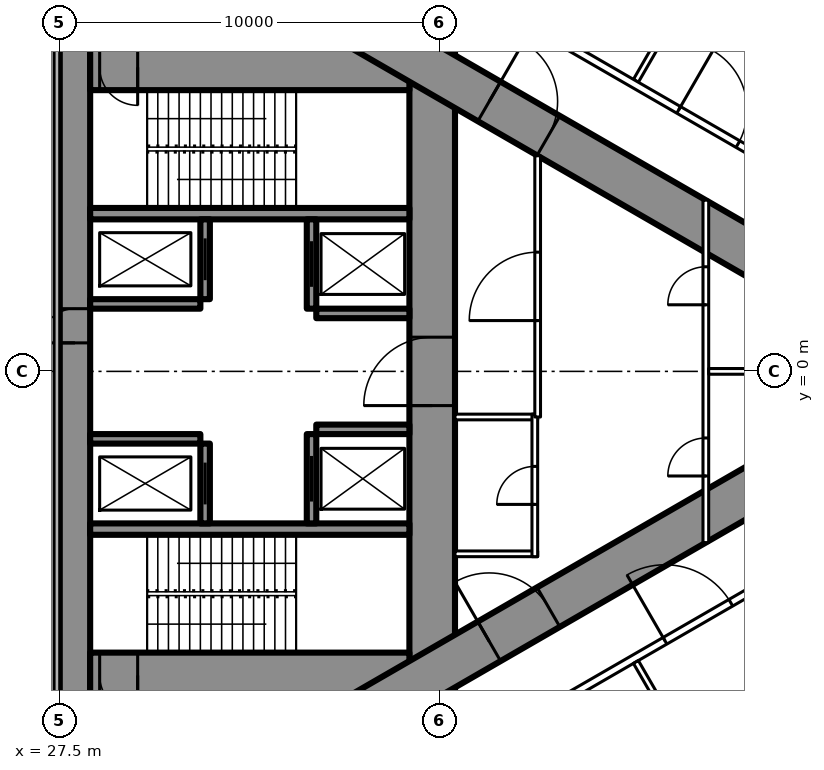
"""IFC4 building model, lengths in metres.
Left out: names, types, materials, properties, quantities, classifications, styles, units other than length and angle.
Written with IfcOpenShell. Run it as: python <this file> out.ifc"""

import sys

from ifc_helpers import new_model, si_unit, direction, frame, frame_2d, origin, place, context, subcontext, project, spatial, rectangle, extrude, element, fill, save


model = new_model("IFC4")
c1 = context("Model", 3, precision=1e-05, world=origin(), true_north=direction((0.0, 1.0)))
c2 = subcontext(c1, "Body", "Model", "MODEL_VIEW")
j1 = project(units=[si_unit("LENGTHUNIT", "METRE"), si_unit("PLANEANGLEUNIT", "RADIAN")], contexts=[c1])
p1 = place(None, origin())
s1 = spatial("IfcSite", under=j1, at=p1, CompositionType="ELEMENT")
p2 = place(p1, origin())
s2 = spatial("IfcBuilding", under=s1, at=p2, CompositionType="ELEMENT")
p3 = place(p2, frame((0.0, 0.0, 251.9)))
s3 = spatial("IfcBuildingStorey", under=s2, at=p3, CompositionType="ELEMENT", Elevation=251.9)
p4 = place(p3, frame((27.9, -8.6, 0.0), z_axis=(0.0, 0.0, 1.0), x_axis=(0.0, 1.0, 0.0)))
e1 = element("IfcWall", 1, at=p4, inside=s3, PredefinedType="SHEAR", context=c2, shape_type="SweptSolid", body=[
    extrude(rectangle(XDim=17.2, YDim=0.8, at=frame_2d((8.6, 0.0))), origin(), (0.0, 0.0, 1.0), 5.4),
])
p5 = place(p4, frame((9.35, 0.0, 0.0)))
e2 = element("IfcOpeningElement", 2, at=p5, cuts=e1, PredefinedType="OPENING", context=c2, shape_type="SweptSolid", body=[
    extrude(rectangle(XDim=0.9, YDim=2.2, at=frame_2d((0.45, 1.1))), frame((0.0, 0.41, 0.0), z_axis=(0.0, -1.0, 0.0), x_axis=(1.0, 0.0, 0.0)), (0.0, 0.0, 1.0), 0.82),
])
p6 = place(p3, frame((37.3, -8.6, 0.0), z_axis=(0.0, 0.0, 1.0), x_axis=(0.0, 1.0, 0.0)))
e3 = element("IfcWall", 3, at=p6, inside=s3, PredefinedType="SHEAR", context=c2, shape_type="SweptSolid", body=[
    extrude(rectangle(XDim=17.2, YDim=1.2, at=frame_2d((8.6, 0.0))), origin(), (0.0, 0.0, 1.0), 5.4),
])
p7 = place(p6, frame((7.7, 0.0, 0.0)))
e4 = element("IfcOpeningElement", 4, at=p7, cuts=e3, PredefinedType="OPENING", context=c2, shape_type="SweptSolid", body=[
    extrude(rectangle(XDim=1.8, YDim=2.2, at=frame_2d((0.9, 1.1))), frame((0.0, 0.61, 0.0), z_axis=(0.0, -1.0, 0.0), x_axis=(1.0, 0.0, 0.0)), (0.0, 0.0, 1.0), 1.22),
])
p8 = place(p3, frame((28.3, -8.0, 0.0), z_axis=(0.0, 0.0, 1.0), x_axis=(1.0, 0.0, 0.0)))
e5 = element("IfcWall", 5, at=p8, inside=s3, PredefinedType="SHEAR", context=c2, shape_type="SweptSolid", body=[
    extrude(rectangle(XDim=8.4, YDim=1.2, at=frame_2d((4.2, 0.0))), origin(), (0.0, 0.0, 1.0), 5.4),
])
p9 = place(p8, frame((0.25, 0.0, 0.0)))
e6 = element("IfcOpeningElement", 6, at=p9, cuts=e5, PredefinedType="OPENING", context=c2, shape_type="SweptSolid", body=[
    extrude(rectangle(XDim=1.0, YDim=2.2, at=frame_2d((0.5, 1.1))), frame((0.0, 0.61, 0.0), z_axis=(0.0, -1.0, 0.0), x_axis=(1.0, 0.0, 0.0)), (0.0, 0.0, 1.0), 1.22),
])
p10 = place(p3, frame((28.3, 8.0, 0.0), z_axis=(0.0, 0.0, 1.0), x_axis=(1.0, 0.0, 0.0)))
e7 = element("IfcWall", 7, at=p10, inside=s3, PredefinedType="SHEAR", context=c2, shape_type="SweptSolid", body=[
    extrude(rectangle(XDim=8.4, YDim=1.2, at=frame_2d((4.2, 0.0))), origin(), (0.0, 0.0, 1.0), 5.4),
])
p11 = place(p10, frame((0.25, 0.0, 0.0)))
e8 = element("IfcOpeningElement", 8, at=p11, cuts=e7, PredefinedType="OPENING", context=c2, shape_type="SweptSolid", body=[
    extrude(rectangle(XDim=1.0, YDim=2.2, at=frame_2d((0.5, 1.1))), frame((0.0, 0.61, 0.0), z_axis=(0.0, -1.0, 0.0), x_axis=(1.0, 0.0, 0.0)), (0.0, 0.0, 1.0), 1.22),
])
for number, where, z_axis, x_axis in (
    (9, (28.3, -4.15, 0.0), (0.0, 0.0, 1.0), (1.0, 0.0, 0.0)),
    (10, (28.3, 4.15, 0.0), (0.0, 0.0, 1.0), (1.0, 0.0, 0.0)),
):
    element("IfcWall", number, at=place(p3, frame(where, z_axis=z_axis, x_axis=x_axis)), inside=s3, PredefinedType="SHEAR", context=c2, shape_type="SweptSolid", body=[
        extrude(rectangle(XDim=8.4, YDim=0.3, at=frame_2d((4.2, 0.0))), origin(), (0.0, 0.0, 1.0), 5.4),
    ])
p12 = place(p3, frame((31.325, -4.0, 0.0), z_axis=(0.0, 0.0, 1.0), x_axis=(0.0, 1.0, 0.0)))
e11 = element("IfcWall", 11, at=p12, inside=s3, PredefinedType="SHEAR", context=c2, shape_type="SweptSolid", body=[
    extrude(rectangle(XDim=2.1, YDim=0.25, at=frame_2d((1.05, 0.0))), origin(), (0.0, 0.0, 1.0), 5.4),
])
p13 = place(p12, frame((0.5, 0.0, 0.0)))
e12 = element("IfcOpeningElement", 12, at=p13, cuts=e11, PredefinedType="OPENING", context=c2, shape_type="SweptSolid", body=[
    extrude(rectangle(XDim=1.1, YDim=2.2, at=frame_2d((0.55, 1.1))), frame((0.0, 0.135, 0.0), z_axis=(0.0, -1.0, 0.0), x_axis=(1.0, 0.0, 0.0)), (0.0, 0.0, 1.0), 0.27),
])
p14 = place(p3, frame((34.125, -4.0, 0.0), z_axis=(0.0, 0.0, 1.0), x_axis=(0.0, 1.0, 0.0)))
e13 = element("IfcWall", 13, at=p14, inside=s3, PredefinedType="SHEAR", context=c2, shape_type="SweptSolid", body=[
    extrude(rectangle(XDim=2.35, YDim=0.25, at=frame_2d((1.175, 0.0))), origin(), (0.0, 0.0, 1.0), 5.4),
])
p15 = place(p14, frame((0.575, 0.0, 0.0)))
e14 = element("IfcOpeningElement", 14, at=p15, cuts=e13, PredefinedType="OPENING", context=c2, shape_type="SweptSolid", body=[
    extrude(rectangle(XDim=1.2, YDim=2.2, at=frame_2d((0.6, 1.1))), frame((0.0, 0.135, 0.0), z_axis=(0.0, -1.0, 0.0), x_axis=(1.0, 0.0, 0.0)), (0.0, 0.0, 1.0), 0.27),
])
p16 = place(p3, frame((28.3, -1.775, 0.0), z_axis=(0.0, 0.0, 1.0), x_axis=(1.0, 0.0, 0.0)))
e15 = element("IfcWall", 15, at=p16, inside=s3, PredefinedType="SHEAR", context=c2, shape_type="SweptSolid", body=[
    extrude(rectangle(XDim=2.9, YDim=0.25, at=frame_2d((1.45, 0.0))), origin(), (0.0, 0.0, 1.0), 5.4),
])
p17 = place(p3, frame((34.25, -1.525, 0.0), z_axis=(0.0, 0.0, 1.0), x_axis=(1.0, 0.0, 0.0)))
e16 = element("IfcWall", 16, at=p17, inside=s3, PredefinedType="SHEAR", context=c2, shape_type="SweptSolid", body=[
    extrude(rectangle(XDim=2.45, YDim=0.25, at=frame_2d((1.225, 0.0))), origin(), (0.0, 0.0, 1.0), 5.4),
])
p18 = place(p3, frame((31.325, 1.9, 0.0), z_axis=(0.0, 0.0, 1.0), x_axis=(0.0, 1.0, 0.0)))
e17 = element("IfcWall", 17, at=p18, inside=s3, PredefinedType="SHEAR", context=c2, shape_type="SweptSolid", body=[
    extrude(rectangle(XDim=2.1, YDim=0.25, at=frame_2d((1.05, 0.0))), origin(), (0.0, 0.0, 1.0), 5.4),
])
p19 = place(p18, frame((0.5, 0.0, 0.0)))
e18 = element("IfcOpeningElement", 18, at=p19, cuts=e17, PredefinedType="OPENING", context=c2, shape_type="SweptSolid", body=[
    extrude(rectangle(XDim=1.1, YDim=2.2, at=frame_2d((0.55, 1.1))), frame((0.0, 0.135, 0.0), z_axis=(0.0, -1.0, 0.0), x_axis=(1.0, 0.0, 0.0)), (0.0, 0.0, 1.0), 0.27),
])
p20 = place(p3, frame((34.125, 1.65, 0.0), z_axis=(0.0, 0.0, 1.0), x_axis=(0.0, 1.0, 0.0)))
e19 = element("IfcWall", 19, at=p20, inside=s3, PredefinedType="SHEAR", context=c2, shape_type="SweptSolid", body=[
    extrude(rectangle(XDim=2.35, YDim=0.25, at=frame_2d((1.175, 0.0))), origin(), (0.0, 0.0, 1.0), 5.4),
])
p21 = place(p20, frame((0.575, 0.0, 0.0)))
e20 = element("IfcOpeningElement", 20, at=p21, cuts=e19, PredefinedType="OPENING", context=c2, shape_type="SweptSolid", body=[
    extrude(rectangle(XDim=1.2, YDim=2.2, at=frame_2d((0.6, 1.1))), frame((0.0, 0.135, 0.0), z_axis=(0.0, -1.0, 0.0), x_axis=(1.0, 0.0, 0.0)), (0.0, 0.0, 1.0), 0.27),
])
p22 = place(p3, frame((28.3, 1.775, 0.0), z_axis=(0.0, 0.0, 1.0), x_axis=(1.0, 0.0, 0.0)))
e21 = element("IfcWall", 21, at=p22, inside=s3, PredefinedType="SHEAR", context=c2, shape_type="SweptSolid", body=[
    extrude(rectangle(XDim=2.9, YDim=0.25, at=frame_2d((1.45, 0.0))), origin(), (0.0, 0.0, 1.0), 5.4),
])
p23 = place(p3, frame((34.25, 1.525, 0.0), z_axis=(0.0, 0.0, 1.0), x_axis=(1.0, 0.0, 0.0)))
e22 = element("IfcWall", 22, at=p23, inside=s3, PredefinedType="SHEAR", context=c2, shape_type="SweptSolid", body=[
    extrude(rectangle(XDim=2.45, YDim=0.25, at=frame_2d((1.225, 0.0))), origin(), (0.0, 0.0, 1.0), 5.4),
])
p24 = place(p3, frame((27.2, -13.8, 0.0), z_axis=(0.0, 0.0, 1.0), x_axis=(0.866027159892, 0.499996958321, 0.0)))
e23 = element("IfcWall", 23, at=p24, inside=s3, PredefinedType="SHEAR", context=c2, shape_type="SweptSolid", body=[
    extrude(rectangle(XDim=27.947, YDim=1.2, at=frame_2d((13.973, 0.0))), origin(), (0.0, 0.0, 1.0), 5.4),
])
p25 = place(p24, frame((4.6, 0.0, 0.0)))
e24 = element("IfcOpeningElement", 24, at=p25, cuts=e23, PredefinedType="OPENING", context=c2, shape_type="SweptSolid", body=[
    extrude(rectangle(XDim=1.0, YDim=2.2, at=frame_2d((0.5, 1.1))), frame((0.0, 0.61, 0.0), z_axis=(0.0, -1.0, 0.0), x_axis=(1.0, 0.0, 0.0)), (0.0, 0.0, 1.0), 1.22),
])
p26 = place(p24, frame((13.395, 0.0, 0.0)))
e25 = element("IfcOpeningElement", 25, at=p26, cuts=e23, PredefinedType="OPENING", context=c2, shape_type="SweptSolid", body=[
    extrude(rectangle(XDim=1.8, YDim=2.2, at=frame_2d((0.9, 1.1))), frame((0.0, 0.61, 0.0), z_axis=(0.0, -1.0, 0.0), x_axis=(1.0, 0.0, 0.0)), (0.0, 0.0, 1.0), 1.22),
])
p27 = place(p3, frame((27.2, 13.8, 0.0), z_axis=(0.0, 0.0, 1.0), x_axis=(0.866024515034, -0.500001539357, 0.0)))
e26 = element("IfcWall", 26, at=p27, inside=s3, PredefinedType="SHEAR", context=c2, shape_type="SweptSolid", body=[
    extrude(rectangle(XDim=26.907, YDim=1.2, at=frame_2d((13.454, 0.0))), origin(), (0.0, 0.0, 1.0), 5.4),
])
p28 = place(p27, frame((4.6, 0.0, 0.0)))
e27 = element("IfcOpeningElement", 27, at=p28, cuts=e26, PredefinedType="OPENING", context=c2, shape_type="SweptSolid", body=[
    extrude(rectangle(XDim=1.0, YDim=2.2, at=frame_2d((0.5, 1.1))), frame((0.0, 0.61, 0.0), z_axis=(0.0, -1.0, 0.0), x_axis=(1.0, 0.0, 0.0)), (0.0, 0.0, 1.0), 1.22),
])
p29 = place(p27, frame((13.395, 0.0, 0.0)))
e28 = element("IfcOpeningElement", 28, at=p29, cuts=e26, PredefinedType="OPENING", context=c2, shape_type="SweptSolid", body=[
    extrude(rectangle(XDim=1.8, YDim=2.2, at=frame_2d((0.9, 1.1))), frame((0.0, 0.61, 0.0), z_axis=(0.0, -1.0, 0.0), x_axis=(1.0, 0.0, 0.0)), (0.0, 0.0, 1.0), 1.22),
])
p30 = place(p3, frame((28.907, -15.47, 0.0), z_axis=(0.0, 0.0, 1.0), x_axis=(0.866023700353, 0.500002950419, 0.0)))
e29 = element("IfcWall", 29, at=p30, inside=s3, PredefinedType="PARTITIONING", context=c2, shape_type="SweptSolid", body=[
    extrude(rectangle(XDim=30.941, YDim=0.2, at=frame_2d((15.47, 0.0))), origin(), (0.0, 0.0, 1.0), 5.15),
])
p31 = place(p30, frame((7.124, 0.0, 0.0)))
e30 = element("IfcOpeningElement", 30, at=p31, cuts=e29, PredefinedType="OPENING", context=c2, shape_type="SweptSolid", body=[
    extrude(rectangle(XDim=1.8, YDim=2.2, at=frame_2d((0.9, 1.1))), frame((0.0, 0.11, 0.0), z_axis=(0.0, -1.0, 0.0), x_axis=(1.0, 0.0, 0.0)), (0.0, 0.0, 1.0), 0.22),
])
p32 = place(p30, frame((16.765, 0.0, 0.0)))
e31 = element("IfcOpeningElement", 31, at=p32, cuts=e29, PredefinedType="OPENING", context=c2, shape_type="SweptSolid", body=[
    extrude(rectangle(XDim=2.0, YDim=2.4, at=frame_2d((1.0, 1.2))), frame((0.0, 0.11, 0.0), z_axis=(0.0, -1.0, 0.0), x_axis=(1.0, 0.0, 0.0)), (0.0, 0.0, 1.0), 0.22),
])
p33 = place(p30, frame((20.748, 0.0, 0.0)))
e32 = element("IfcOpeningElement", 32, at=p33, cuts=e29, PredefinedType="OPENING", context=c2, shape_type="SweptSolid", body=[
    extrude(rectangle(XDim=1.8, YDim=2.2, at=frame_2d((0.9, 1.1))), frame((0.0, 0.11, 0.0), z_axis=(0.0, -1.0, 0.0), x_axis=(1.0, 0.0, 0.0)), (0.0, 0.0, 1.0), 0.22),
])
p34 = place(p30, frame((26.252, 0.0, 0.0)))
e33 = element("IfcOpeningElement", 33, at=p34, cuts=e29, PredefinedType="OPENING", context=c2, shape_type="SweptSolid", body=[
    extrude(rectangle(XDim=1.8, YDim=2.2, at=frame_2d((0.9, 1.1))), frame((0.0, 0.11, 0.0), z_axis=(0.0, -1.0, 0.0), x_axis=(1.0, 0.0, 0.0)), (0.0, 0.0, 1.0), 0.22),
])
for number, where, z_axis, x_axis in (
    (34, (42.66, -7.646, 0.0), (0.0, 0.0, 1.0), (0.5, -0.866, 0.0)),
    (35, (42.66, 7.646, 0.0), (0.0, 0.0, 1.0), (0.5, 0.866, 0.0)),
):
    element("IfcWall", number, at=place(p3, frame(where, z_axis=z_axis, x_axis=x_axis)), inside=s3, PredefinedType="PARTITIONING", context=c2, shape_type="SweptSolid", body=[
        extrude(rectangle(XDim=6.398, YDim=0.15, at=frame_2d((3.199, 0.0))), origin(), (0.0, 0.0, 1.0), 4.25),
    ])
p35 = place(p3, frame((28.907, 15.47, 0.0), z_axis=(0.0, 0.0, 1.0), x_axis=(0.866026627509, -0.499997880441, 0.0)))
e36 = element("IfcWall", 36, at=p35, inside=s3, PredefinedType="PARTITIONING", context=c2, shape_type="SweptSolid", body=[
    extrude(rectangle(XDim=20.563, YDim=0.2, at=frame_2d((10.282, 0.0))), origin(), (0.0, 0.0, 1.0), 5.15),
])
p36 = place(p35, frame((17.181, 0.0, 0.0)))
e37 = element("IfcOpeningElement", 37, at=p36, cuts=e36, PredefinedType="OPENING", context=c2, shape_type="SweptSolid", body=[
    extrude(rectangle(XDim=1.8, YDim=2.2, at=frame_2d((0.9, 1.1))), frame((0.0, 0.11, 0.0), z_axis=(0.0, -1.0, 0.0), x_axis=(1.0, 0.0, 0.0)), (0.0, 0.0, 1.0), 0.22),
])
p37 = place(p35, frame((7.024, 0.0, 0.0)))
e38 = element("IfcOpeningElement", 38, at=p37, cuts=e36, PredefinedType="OPENING", context=c2, shape_type="SweptSolid", body=[
    extrude(rectangle(XDim=2.0, YDim=2.4, at=frame_2d((1.0, 1.2))), frame((0.0, 0.11, 0.0), z_axis=(0.0, -1.0, 0.0), x_axis=(1.0, 0.0, 0.0)), (0.0, 0.0, 1.0), 0.22),
])
for number, where, z_axis, x_axis in (
    (39, (37.9, -1.2, 0.0), (0.0, 0.0, 1.0), (1.0, 0.0, 0.0)),
    (40, (37.9, -4.8, 0.0), (0.0, 0.0, 1.0), (1.0, 0.0, 0.0)),
):
    element("IfcWall", number, at=place(p3, frame(where, z_axis=z_axis, x_axis=x_axis)), inside=s3, PredefinedType="PARTITIONING", context=c2, shape_type="SweptSolid", body=[
        extrude(rectangle(XDim=2.175, YDim=0.15, at=frame_2d((1.087, 0.0))), origin(), (0.0, 0.0, 1.0), 5.15),
    ])
p38 = place(p3, frame((40.0, -4.875, 0.0), z_axis=(0.0, 0.0, 1.0), x_axis=(0.0, 1.0, 0.0)))
e41 = element("IfcWall", 41, at=p38, inside=s3, PredefinedType="PARTITIONING", context=c2, shape_type="SweptSolid", body=[
    extrude(rectangle(XDim=3.75, YDim=0.15, at=frame_2d((1.875, 0.0))), origin(), (0.0, 0.0, 1.0), 5.15),
])
p39 = place(p38, frame((1.375, 0.0, 0.0)))
e42 = element("IfcOpeningElement", 42, at=p39, cuts=e41, PredefinedType="OPENING", context=c2, shape_type="SweptSolid", body=[
    extrude(rectangle(XDim=1.0, YDim=2.2, at=frame_2d((0.5, 1.1))), frame((0.0, 0.085, 0.0), z_axis=(0.0, -1.0, 0.0), x_axis=(1.0, 0.0, 0.0)), (0.0, 0.0, 1.0), 0.17),
])
p40 = place(p3, frame((40.075, -1.2, 0.0), z_axis=(0.0, 0.0, 1.0), x_axis=(0.0, 1.0, 0.0)))
e43 = element("IfcWall", 43, at=p40, inside=s3, PredefinedType="PARTITIONING", context=c2, shape_type="SweptSolid", body=[
    extrude(rectangle(XDim=6.874, YDim=0.15, at=frame_2d((3.437, 0.0))), origin(), (0.0, 0.0, 1.0), 5.15),
])
p41 = place(p40, frame((2.537, 0.0, 0.0)))
e44 = element("IfcOpeningElement", 44, at=p41, cuts=e43, PredefinedType="OPENING", context=c2, shape_type="SweptSolid", body=[
    extrude(rectangle(XDim=1.8, YDim=2.2, at=frame_2d((0.9, 1.1))), frame((0.0, 0.085, 0.0), z_axis=(0.0, -1.0, 0.0), x_axis=(1.0, 0.0, 0.0)), (0.0, 0.0, 1.0), 0.17),
])
p42 = place(p3, frame((44.5, -4.505, 0.0), z_axis=(0.0, 0.0, 1.0), x_axis=(0.0, 1.0, 0.0)))
e45 = element("IfcWall", 45, at=p42, inside=s3, PredefinedType="PARTITIONING", context=c2, shape_type="SweptSolid", body=[
    extrude(rectangle(XDim=9.009, YDim=0.15, at=frame_2d((4.505, 0.0))), origin(), (0.0, 0.0, 1.0), 5.15),
])
p43 = place(p42, frame((1.752, 0.0, 0.0)))
e46 = element("IfcOpeningElement", 46, at=p43, cuts=e45, PredefinedType="OPENING", context=c2, shape_type="SweptSolid", body=[
    extrude(rectangle(XDim=1.0, YDim=2.2, at=frame_2d((0.5, 1.1))), frame((0.0, 0.085, 0.0), z_axis=(0.0, -1.0, 0.0), x_axis=(1.0, 0.0, 0.0)), (0.0, 0.0, 1.0), 0.17),
])
p44 = place(p42, frame((6.257, 0.0, 0.0)))
e47 = element("IfcOpeningElement", 47, at=p44, cuts=e45, PredefinedType="OPENING", context=c2, shape_type="SweptSolid", body=[
    extrude(rectangle(XDim=1.0, YDim=2.2, at=frame_2d((0.5, 1.1))), frame((0.0, 0.085, 0.0), z_axis=(0.0, -1.0, 0.0), x_axis=(1.0, 0.0, 0.0)), (0.0, 0.0, 1.0), 0.17),
])
p45 = place(p3, frame((44.575, 0.0, 0.0), z_axis=(0.0, 0.0, 1.0), x_axis=(1.0, 0.0, 0.0)))
e48 = element("IfcWall", 48, at=p45, inside=s3, PredefinedType="PARTITIONING", context=c2, shape_type="SweptSolid", body=[
    extrude(rectangle(XDim=7.727, YDim=0.15, at=frame_2d((3.864, 0.0))), origin(), (0.0, 0.0, 1.0), 4.25),
])
p46 = place(p32, origin())
e49 = element("IfcDoor", 49, at=p46, inside=s3, OperationType="DOUBLE_DOOR_SINGLE_SWING", PredefinedType="DOOR", context=c2, shape_type="SweptSolid", body=[
    extrude(rectangle(XDim=2.0, YDim=2.4, at=frame_2d((1.0, 1.2))), frame((0.0, 0.025, 0.0), z_axis=(0.0, -1.0, 0.0), x_axis=(1.0, 0.0, 0.0)), (0.0, 0.0, 1.0), 0.05),
])
fill(e31, e49)
p47 = place(p36, origin())
e50 = element("IfcDoor", 50, at=p47, inside=s3, OperationType="DOUBLE_DOOR_SINGLE_SWING", PredefinedType="DOOR", context=c2, shape_type="SweptSolid", body=[
    extrude(rectangle(XDim=1.8, YDim=2.2, at=frame_2d((0.9, 1.1))), frame((0.0, 0.025, 0.0), z_axis=(0.0, -1.0, 0.0), x_axis=(1.0, 0.0, 0.0)), (0.0, 0.0, 1.0), 0.05),
])
fill(e37, e50)
p48 = place(p39, origin())
e51 = element("IfcDoor", 51, at=p48, inside=s3, OperationType="SINGLE_SWING_LEFT", PredefinedType="DOOR", context=c2, shape_type="SweptSolid", body=[
    extrude(rectangle(XDim=1.0, YDim=2.2, at=frame_2d((0.5, 1.1))), frame((0.0, 0.025, 0.0), z_axis=(0.0, -1.0, 0.0), x_axis=(1.0, 0.0, 0.0)), (0.0, 0.0, 1.0), 0.05),
])
fill(e42, e51)
p49 = place(p41, origin())
e52 = element("IfcDoor", 52, at=p49, inside=s3, OperationType="DOUBLE_DOOR_SINGLE_SWING", PredefinedType="DOOR", context=c2, shape_type="SweptSolid", body=[
    extrude(rectangle(XDim=1.8, YDim=2.2, at=frame_2d((0.9, 1.1))), frame((0.0, 0.025, 0.0), z_axis=(0.0, -1.0, 0.0), x_axis=(1.0, 0.0, 0.0)), (0.0, 0.0, 1.0), 0.05),
])
fill(e44, e52)
p50 = place(p43, origin())
e53 = element("IfcDoor", 53, at=p50, inside=s3, OperationType="SINGLE_SWING_LEFT", PredefinedType="DOOR", context=c2, shape_type="SweptSolid", body=[
    extrude(rectangle(XDim=1.0, YDim=2.2, at=frame_2d((0.5, 1.1))), frame((0.0, 0.025, 0.0), z_axis=(0.0, -1.0, 0.0), x_axis=(1.0, 0.0, 0.0)), (0.0, 0.0, 1.0), 0.05),
])
fill(e46, e53)
p51 = place(p44, origin())
e54 = element("IfcDoor", 54, at=p51, inside=s3, OperationType="SINGLE_SWING_LEFT", PredefinedType="DOOR", context=c2, shape_type="SweptSolid", body=[
    extrude(rectangle(XDim=1.0, YDim=2.2, at=frame_2d((0.5, 1.1))), frame((0.0, 0.025, 0.0), z_axis=(0.0, -1.0, 0.0), x_axis=(1.0, 0.0, 0.0)), (0.0, 0.0, 1.0), 0.05),
])
fill(e47, e54)
p52 = place(p26, origin())
e55 = element("IfcDoor", 55, at=p52, inside=s3, OperationType="DOUBLE_DOOR_SINGLE_SWING", PredefinedType="DOOR", context=c2, shape_type="SweptSolid", body=[
    extrude(rectangle(XDim=1.8, YDim=2.2, at=frame_2d((0.9, 1.1))), frame((0.0, 0.025, 0.0), z_axis=(0.0, -1.0, 0.0), x_axis=(1.0, 0.0, 0.0)), (0.0, 0.0, 1.0), 0.05),
])
fill(e25, e55)
p53 = place(p29, origin())
e56 = element("IfcDoor", 56, at=p53, inside=s3, OperationType="DOUBLE_DOOR_SINGLE_SWING", PredefinedType="DOOR", context=c2, shape_type="SweptSolid", body=[
    extrude(rectangle(XDim=1.8, YDim=2.2, at=frame_2d((0.9, 1.1))), frame((0.0, 0.025, 0.0), z_axis=(0.0, -1.0, 0.0), x_axis=(1.0, 0.0, 0.0)), (0.0, 0.0, 1.0), 0.05),
])
fill(e28, e56)
p54 = place(p7, origin())
e57 = element("IfcDoor", 57, at=p54, inside=s3, OperationType="DOUBLE_DOOR_SINGLE_SWING", PredefinedType="DOOR", context=c2, shape_type="SweptSolid", body=[
    extrude(rectangle(XDim=1.8, YDim=2.2, at=frame_2d((0.9, 1.1))), frame((0.0, 0.025, 0.0), z_axis=(0.0, -1.0, 0.0), x_axis=(1.0, 0.0, 0.0)), (0.0, 0.0, 1.0), 0.05),
])
fill(e4, e57)
p55 = place(p9, origin())
e58 = element("IfcDoor", 58, at=p55, inside=s3, OperationType="SINGLE_SWING_RIGHT", PredefinedType="DOOR", context=c2, shape_type="SweptSolid", body=[
    extrude(rectangle(XDim=1.0, YDim=2.2, at=frame_2d((0.5, 1.1))), frame((0.0, 0.025, 0.0), z_axis=(0.0, -1.0, 0.0), x_axis=(1.0, 0.0, 0.0)), (0.0, 0.0, 1.0), 0.05),
])
fill(e6, e58)
p56 = place(p11, origin())
e59 = element("IfcDoor", 59, at=p56, inside=s3, OperationType="SINGLE_SWING_RIGHT", PredefinedType="DOOR", context=c2, shape_type="SweptSolid", body=[
    extrude(rectangle(XDim=1.0, YDim=2.2, at=frame_2d((0.5, 1.1))), frame((0.0, 0.025, 0.0), z_axis=(0.0, -1.0, 0.0), x_axis=(1.0, 0.0, 0.0)), (0.0, 0.0, 1.0), 0.05),
])
fill(e8, e59)
p57 = place(p5, origin())
e60 = element("IfcDoor", 60, at=p57, inside=s3, OperationType="SINGLE_SWING_LEFT", PredefinedType="DOOR", context=c2, shape_type="SweptSolid", body=[
    extrude(rectangle(XDim=0.9, YDim=2.2, at=frame_2d((0.45, 1.1))), frame((0.0, 0.025, 0.0), z_axis=(0.0, -1.0, 0.0), x_axis=(1.0, 0.0, 0.0)), (0.0, 0.0, 1.0), 0.05),
])
fill(e2, e60)
p58 = place(p13, origin())
e61 = element("IfcDoor", 61, at=p58, inside=s3, OperationType="SLIDING_TO_LEFT", PredefinedType="USERDEFINED", context=c2, shape_type="SweptSolid", body=[
    extrude(rectangle(XDim=1.1, YDim=2.2, at=frame_2d((0.55, 1.1))), frame((0.0, 0.025, 0.0), z_axis=(0.0, -1.0, 0.0), x_axis=(1.0, 0.0, 0.0)), (0.0, 0.0, 1.0), 0.05),
])
fill(e12, e61)
p59 = place(p19, origin())
e62 = element("IfcDoor", 62, at=p59, inside=s3, OperationType="SLIDING_TO_LEFT", PredefinedType="USERDEFINED", context=c2, shape_type="SweptSolid", body=[
    extrude(rectangle(XDim=1.1, YDim=2.2, at=frame_2d((0.55, 1.1))), frame((0.0, 0.025, 0.0), z_axis=(0.0, -1.0, 0.0), x_axis=(1.0, 0.0, 0.0)), (0.0, 0.0, 1.0), 0.05),
])
fill(e18, e62)
p60 = place(p15, origin())
e63 = element("IfcDoor", 63, at=p60, inside=s3, OperationType="DOUBLE_DOOR_SLIDING", PredefinedType="USERDEFINED", context=c2, shape_type="SweptSolid", body=[
    extrude(rectangle(XDim=1.2, YDim=2.2, at=frame_2d((0.6, 1.1))), frame((0.0, 0.025, 0.0), z_axis=(0.0, -1.0, 0.0), x_axis=(1.0, 0.0, 0.0)), (0.0, 0.0, 1.0), 0.05),
])
fill(e14, e63)
p61 = place(p21, origin())
e64 = element("IfcDoor", 64, at=p61, inside=s3, OperationType="DOUBLE_DOOR_SLIDING", PredefinedType="USERDEFINED", context=c2, shape_type="SweptSolid", body=[
    extrude(rectangle(XDim=1.2, YDim=2.2, at=frame_2d((0.6, 1.1))), frame((0.0, 0.025, 0.0), z_axis=(0.0, -1.0, 0.0), x_axis=(1.0, 0.0, 0.0)), (0.0, 0.0, 1.0), 0.05),
])
fill(e20, e64)
save(model, sys.argv[1])
